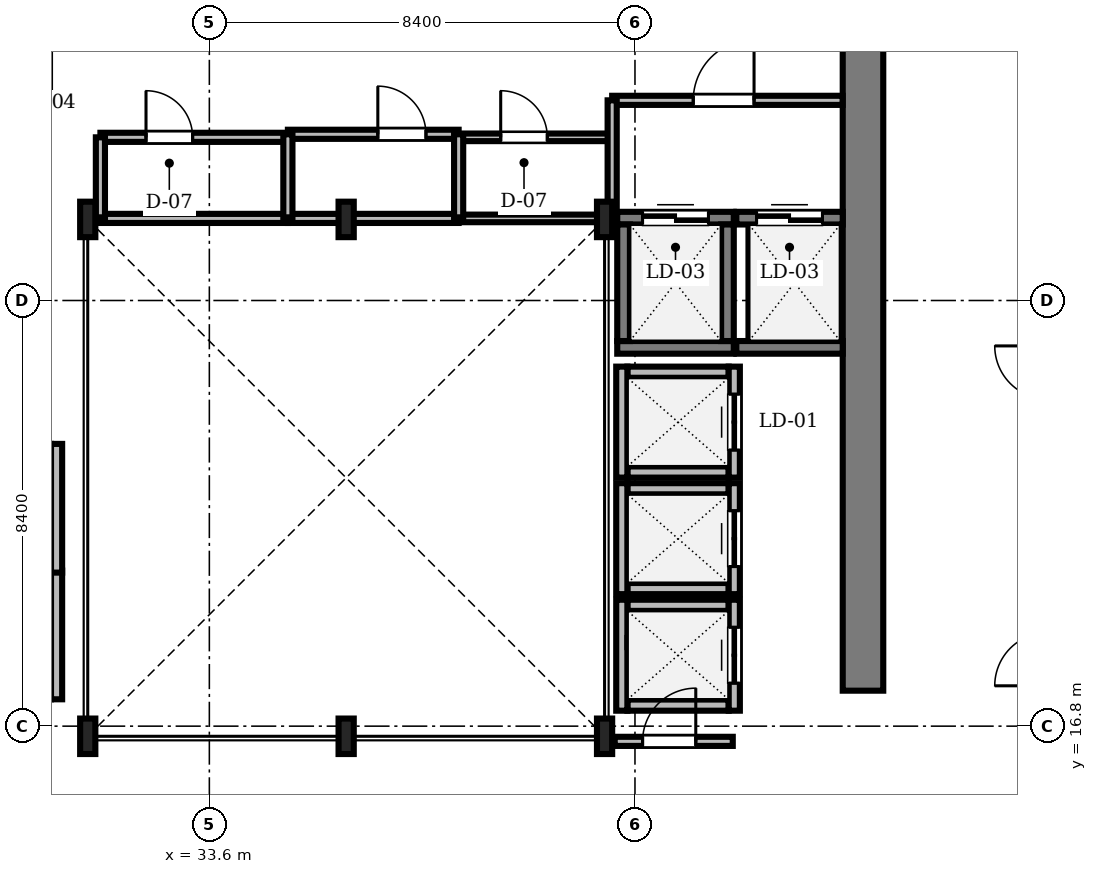
"""IFC4 building model, lengths in metres.
Left out: names, types, materials, properties, quantities, classifications, styles, units other than length and angle.
Written with IfcOpenShell. Run it as: python <this file> out.ifc"""

import sys

from ifc_helpers import new_model, si_unit, direction, frame, frame_2d, origin, origin_2d, place, context, subcontext, project, spatial, rectangle, i_section, extrude, source, transform, mapped, element, fill, save


model = new_model("IFC4")
c1 = context("Model", 3, precision=1e-05, world=origin(), true_north=direction((0.0, 1.0)))
c2 = subcontext(c1, "Body", "Model", "MODEL_VIEW")
j1 = project(units=[si_unit("LENGTHUNIT", "METRE"), si_unit("PLANEANGLEUNIT", "RADIAN")], contexts=[c1])
p1 = place(None, origin())
s1 = spatial("IfcSite", under=j1, at=p1, CompositionType="ELEMENT")
p2 = place(p1, origin())
s2 = spatial("IfcBuilding", under=s1, at=p2, CompositionType="ELEMENT")
p3 = place(p2, frame((0.0, 0.0, 184.8)))
s3 = spatial("IfcBuildingStorey", under=s2, at=p3, CompositionType="ELEMENT", Elevation=184.8)
m1 = source(origin(), c2, "Body", "SweptSolid", [
    extrude(rectangle(XDim=13.15, YDim=0.8, at=frame_2d((6.575, 0.0))), origin(), (0.0, 0.0, 1.0), 3.53),
])
p4 = place(p3, frame((46.5, 17.5, 0.0), z_axis=(0.0, 0.0, 1.0), x_axis=(0.0, 1.0, 0.0)))
e1 = element("IfcWall", 1, at=p4, inside=s3, PredefinedType="SHEAR", context=c2, shape_type="MappedRepresentation", body=[
    mapped(m1, transform((0.0, 0.0, 0.0), scale=1.0)),
])
m2 = source(origin(), c2, "Body", "SweptSolid", [
    extrude(i_section(OverallWidth=0.3, OverallDepth=0.7, WebThickness=0.017, FlangeThickness=0.032, FilletRadius=0.027, at=origin_2d()), origin(), (0.0, 0.0, 1.0), 3.53),
])
for number, where, z_axis, x_axis in (
    (2, (31.2, 16.6, 0.0), (0.0, 0.0, 1.0), (1.0, 0.0, 0.0)),
    (3, (36.3, 16.6, 0.0), (0.0, 0.0, 1.0), (1.0, 0.0, 0.0)),
    (4, (41.4, 16.6, 0.0), (0.0, 0.0, 1.0), (1.0, 0.0, 0.0)),
    (5, (41.4, 26.8, 0.0), (0.0, 0.0, 1.0), (1.0, 0.0, 0.0)),
    (6, (36.3, 26.8, 0.0), (0.0, 0.0, 1.0), (1.0, 0.0, 0.0)),
    (7, (31.2, 26.8, 0.0), (0.0, 0.0, 1.0), (1.0, 0.0, 0.0)),
):
    element("IfcColumn", number, at=place(p3, frame(where, z_axis=z_axis, x_axis=x_axis)), inside=s3, PredefinedType="COLUMN", context=c2, shape_type="MappedRepresentation", body=[
        mapped(m2, transform((0.0, 0.0, 0.0), scale=1.0)),
    ])
m3 = source(origin(), c2, "Body", "SweptSolid", [
    extrude(rectangle(XDim=2.0, YDim=0.22, at=frame_2d((1.0, 0.0))), origin(), (0.0, 0.0, 1.0), 3.53),
])
for number, where, z_axis, x_axis in (
    (8, (41.85, 21.815, 0.0), (0.0, 0.0, 1.0), (1.0, 0.0, 0.0)),
    (9, (41.85, 23.785, 0.0), (0.0, 0.0, 1.0), (1.0, 0.0, 0.0)),
):
    element("IfcWall", number, at=place(p3, frame(where, z_axis=z_axis, x_axis=x_axis)), inside=s3, PredefinedType="SOLIDWALL", context=c2, shape_type="MappedRepresentation", body=[
        mapped(m3, transform((0.0, 0.0, 0.0), scale=1.0)),
    ])
m4 = source(origin(), c2, "Body", "SweptSolid", [
    extrude(rectangle(XDim=2.19, YDim=0.22, at=frame_2d((1.095, 0.0))), origin(), (0.0, 0.0, 1.0), 3.53),
])
p5 = place(p3, frame((41.74, 21.705, 0.0), z_axis=(0.0, 0.0, 1.0), x_axis=(0.0, 1.0, 0.0)))
e10 = element("IfcWall", 10, at=p5, inside=s3, PredefinedType="SOLIDWALL", context=c2, shape_type="MappedRepresentation", body=[
    mapped(m4, transform((0.0, 0.0, 0.0), scale=1.0)),
])
p6 = place(p3, frame((43.96, 21.705, 0.0), z_axis=(0.0, 0.0, 1.0), x_axis=(0.0, 1.0, 0.0)))
e11 = element("IfcWall", 11, at=p6, inside=s3, PredefinedType="SOLIDWALL", context=c2, shape_type="MappedRepresentation", body=[
    mapped(m4, transform((0.0, 0.0, 0.0), scale=1.0)),
])
m5 = source(origin(), c2, "Body", "SweptSolid", [
    extrude(rectangle(XDim=1.1, YDim=2.2, at=frame_2d((0.55, 1.1))), frame((0.0, 0.12, 0.0), z_axis=(0.0, -1.0, 0.0), x_axis=(1.0, 0.0, 0.0)), (0.0, 0.0, 1.0), 0.24),
])
p7 = place(p6, frame((0.545, 0.0, 0.0)))
e12 = element("IfcOpeningElement", 12, at=p7, cuts=e11, PredefinedType="OPENING", context=c2, shape_type="MappedRepresentation", body=[
    mapped(m5, transform((0.0, 0.0, 0.0), scale=1.0)),
])
for number, where, z_axis, x_axis in (
    (13, (41.85, 19.515, 0.0), (0.0, 0.0, 1.0), (1.0, 0.0, 0.0)),
    (14, (41.85, 21.485, 0.0), (0.0, 0.0, 1.0), (1.0, 0.0, 0.0)),
):
    element("IfcWall", number, at=place(p3, frame(where, z_axis=z_axis, x_axis=x_axis)), inside=s3, PredefinedType="SOLIDWALL", context=c2, shape_type="MappedRepresentation", body=[
        mapped(m3, transform((0.0, 0.0, 0.0), scale=1.0)),
    ])
p8 = place(p3, frame((41.74, 19.405, 0.0), z_axis=(0.0, 0.0, 1.0), x_axis=(0.0, 1.0, 0.0)))
e15 = element("IfcWall", 15, at=p8, inside=s3, PredefinedType="SOLIDWALL", context=c2, shape_type="MappedRepresentation", body=[
    mapped(m4, transform((0.0, 0.0, 0.0), scale=1.0)),
])
p9 = place(p3, frame((43.96, 19.405, 0.0), z_axis=(0.0, 0.0, 1.0), x_axis=(0.0, 1.0, 0.0)))
e16 = element("IfcWall", 16, at=p9, inside=s3, PredefinedType="SOLIDWALL", context=c2, shape_type="MappedRepresentation", body=[
    mapped(m4, transform((0.0, 0.0, 0.0), scale=1.0)),
])
p10 = place(p9, frame((0.545, 0.0, 0.0)))
e17 = element("IfcOpeningElement", 17, at=p10, cuts=e16, PredefinedType="OPENING", context=c2, shape_type="MappedRepresentation", body=[
    mapped(m5, transform((0.0, 0.0, 0.0), scale=1.0)),
])
for number, where, z_axis, x_axis in (
    (18, (41.85, 17.215, 0.0), (0.0, 0.0, 1.0), (1.0, 0.0, 0.0)),
    (19, (41.85, 19.185, 0.0), (0.0, 0.0, 1.0), (1.0, 0.0, 0.0)),
):
    element("IfcWall", number, at=place(p3, frame(where, z_axis=z_axis, x_axis=x_axis)), inside=s3, PredefinedType="SOLIDWALL", context=c2, shape_type="MappedRepresentation", body=[
        mapped(m3, transform((0.0, 0.0, 0.0), scale=1.0)),
    ])
p11 = place(p3, frame((41.74, 17.105, 0.0), z_axis=(0.0, 0.0, 1.0), x_axis=(0.0, 1.0, 0.0)))
e20 = element("IfcWall", 20, at=p11, inside=s3, PredefinedType="SOLIDWALL", context=c2, shape_type="MappedRepresentation", body=[
    mapped(m4, transform((0.0, 0.0, 0.0), scale=1.0)),
])
p12 = place(p3, frame((43.96, 17.105, 0.0), z_axis=(0.0, 0.0, 1.0), x_axis=(0.0, 1.0, 0.0)))
e21 = element("IfcWall", 21, at=p12, inside=s3, PredefinedType="SOLIDWALL", context=c2, shape_type="MappedRepresentation", body=[
    mapped(m4, transform((0.0, 0.0, 0.0), scale=1.0)),
])
p13 = place(p12, frame((0.545, 0.0, 0.0)))
e22 = element("IfcOpeningElement", 22, at=p13, cuts=e21, PredefinedType="OPENING", context=c2, shape_type="MappedRepresentation", body=[
    mapped(m5, transform((0.0, 0.0, 0.0), scale=1.0)),
])
m6 = source(origin(), c2, "Body", "SweptSolid", [
    extrude(rectangle(XDim=2.54, YDim=0.22, at=frame_2d((1.27, 0.0))), origin(), (0.0, 0.0, 1.0), 3.53),
])
for number, where, z_axis, x_axis in (
    (23, (30.585, 17.33, 0.0), (0.0, 0.0, 1.0), (0.0, 1.0, 0.0)),
    (24, (30.585, 19.83, 0.0), (0.0, 0.0, 1.0), (0.0, 1.0, 0.0)),
):
    element("IfcWall", number, at=place(p3, frame(where, z_axis=z_axis, x_axis=x_axis)), inside=s3, PredefinedType="SOLIDWALL", context=c2, shape_type="MappedRepresentation", body=[
        mapped(m6, transform((0.0, 0.0, 0.0), scale=1.0)),
    ])
m7 = source(origin(), c2, "Body", "SweptSolid", [
    extrude(rectangle(XDim=2.3, YDim=0.25, at=frame_2d((1.15, 0.0))), origin(), (0.0, 0.0, 1.0), 3.53),
])
p14 = place(p3, frame((41.65, 24.275, 0.0), z_axis=(0.0, 0.0, 1.0), x_axis=(1.0, 0.0, 0.0)))
e25 = element("IfcWall", 25, at=p14, inside=s3, PredefinedType="SOLIDWALL", context=c2, shape_type="MappedRepresentation", body=[
    mapped(m7, transform((0.0, 0.0, 0.0), scale=1.0)),
])
p15 = place(p3, frame((41.65, 26.825, 0.0), z_axis=(0.0, 0.0, 1.0), x_axis=(1.0, 0.0, 0.0)))
e26 = element("IfcWall", 26, at=p15, inside=s3, PredefinedType="SOLIDWALL", context=c2, shape_type="MappedRepresentation", body=[
    mapped(m7, transform((0.0, 0.0, 0.0), scale=1.0)),
])
m8 = source(origin(), c2, "Body", "SweptSolid", [
    extrude(rectangle(XDim=1.3, YDim=2.3, at=frame_2d((0.65, 1.15))), frame((0.0, 0.135, 0.0), z_axis=(0.0, -1.0, 0.0), x_axis=(1.0, 0.0, 0.0)), (0.0, 0.0, 1.0), 0.27),
])
p16 = place(p15, frame((0.5, 0.0, 0.0)))
e27 = element("IfcOpeningElement", 27, at=p16, cuts=e26, PredefinedType="OPENING", context=c2, shape_type="MappedRepresentation", body=[
    mapped(m8, transform((0.0, 0.0, 0.0), scale=1.0)),
])
for number, where, z_axis, x_axis in (
    (28, (41.775, 24.4, 0.0), (0.0, 0.0, 1.0), (0.0, 1.0, 0.0)),
    (29, (43.825, 24.4, 0.0), (0.0, 0.0, 1.0), (0.0, 1.0, 0.0)),
):
    element("IfcWall", number, at=place(p3, frame(where, z_axis=z_axis, x_axis=x_axis)), inside=s3, PredefinedType="SOLIDWALL", context=c2, shape_type="MappedRepresentation", body=[
        mapped(m7, transform((0.0, 0.0, 0.0), scale=1.0)),
    ])
m9 = source(origin(), c2, "Body", "SweptSolid", [
    extrude(rectangle(XDim=2.1, YDim=0.25, at=frame_2d((1.05, 0.0))), origin(), (0.0, 0.0, 1.0), 3.53),
])
p17 = place(p3, frame((44.0, 24.275, 0.0), z_axis=(0.0, 0.0, 1.0), x_axis=(1.0, 0.0, 0.0)))
e30 = element("IfcWall", 30, at=p17, inside=s3, PredefinedType="SOLIDWALL", context=c2, shape_type="MappedRepresentation", body=[
    mapped(m9, transform((0.0, 0.0, 0.0), scale=1.0)),
])
p18 = place(p3, frame((44.0, 26.825, 0.0), z_axis=(0.0, 0.0, 1.0), x_axis=(1.0, 0.0, 0.0)))
e31 = element("IfcWall", 31, at=p18, inside=s3, PredefinedType="SOLIDWALL", context=c2, shape_type="MappedRepresentation", body=[
    mapped(m9, transform((0.0, 0.0, 0.0), scale=1.0)),
])
p19 = place(p18, frame((0.4, 0.0, 0.0)))
e32 = element("IfcOpeningElement", 32, at=p19, cuts=e31, PredefinedType="OPENING", context=c2, shape_type="MappedRepresentation", body=[
    mapped(m8, transform((0.0, 0.0, 0.0), scale=1.0)),
])
m10 = source(origin(), c2, "Body", "SweptSolid", [
    extrude(rectangle(XDim=4.548, YDim=0.18, at=frame_2d((2.274, 0.0))), origin(), (0.0, 0.0, 1.0), 3.162),
])
p20 = place(p3, frame((41.55, 29.15, 0.0), z_axis=(0.0, 0.0, 1.0), x_axis=(1.0, 0.0, 0.0)))
e33 = element("IfcWall", 33, at=p20, inside=s3, PredefinedType="PARTITIONING", context=c2, shape_type="MappedRepresentation", body=[
    mapped(m10, transform((0.0, 0.0, 0.0), scale=1.0)),
])
m11 = source(origin(), c2, "Body", "SweptSolid", [
    extrude(rectangle(XDim=1.2, YDim=2.2, at=frame_2d((0.6, 1.1))), frame((0.0, 0.1, 0.0), z_axis=(0.0, -1.0, 0.0), x_axis=(1.0, 0.0, 0.0)), (0.0, 0.0, 1.0), 0.2),
])
p21 = place(p20, frame((1.6, 0.0, 0.0)))
e34 = element("IfcOpeningElement", 34, at=p21, cuts=e33, PredefinedType="OPENING", context=c2, shape_type="MappedRepresentation", body=[
    mapped(m11, transform((0.0, 0.0, 0.0), scale=1.0)),
])
m12 = source(origin(), c2, "Body", "SweptSolid", [
    extrude(rectangle(XDim=3.7, YDim=0.18, at=frame_2d((1.85, 0.0))), origin(), (0.0, 0.0, 1.0), 3.162),
])
p22 = place(p3, frame((31.45, 28.42, 0.0), z_axis=(0.0, 0.0, 1.0), x_axis=(1.0, 0.0, 0.0)))
e35 = element("IfcWall", 35, at=p22, inside=s3, PredefinedType="PARTITIONING", context=c2, shape_type="MappedRepresentation", body=[
    mapped(m12, transform((0.0, 0.0, 0.0), scale=1.0)),
])
m13 = source(origin(), c2, "Body", "SweptSolid", [
    extrude(rectangle(XDim=0.92, YDim=2.1, at=frame_2d((0.46, 1.05))), frame((0.0, 0.1, 0.0), z_axis=(0.0, -1.0, 0.0), x_axis=(1.0, 0.0, 0.0)), (0.0, 0.0, 1.0), 0.2),
])
p23 = place(p22, frame((0.9, 0.0, 0.0)))
e36 = element("IfcOpeningElement", 36, at=p23, cuts=e35, PredefinedType="OPENING", context=c2, shape_type="MappedRepresentation", body=[
    mapped(m13, transform((0.0, 0.0, 0.0), scale=1.0)),
])
m14 = source(origin(), c2, "Body", "SweptSolid", [
    extrude(rectangle(XDim=3.37, YDim=0.18, at=frame_2d((1.685, 0.0))), origin(), (0.0, 0.0, 1.0), 3.53),
])
p24 = place(p3, frame((35.15, 28.48, 0.0), z_axis=(0.0, 0.0, 1.0), x_axis=(1.0, 0.0, 0.0)))
e37 = element("IfcWall", 37, at=p24, inside=s3, PredefinedType="PARTITIONING", context=c2, shape_type="MappedRepresentation", body=[
    mapped(m14, transform((0.0, 0.0, 0.0), scale=1.0)),
])
m15 = source(origin(), c2, "Body", "SweptSolid", [
    extrude(rectangle(XDim=0.95, YDim=2.15, at=frame_2d((0.475, 1.075))), frame((0.0, 0.1, 0.0), z_axis=(0.0, -1.0, 0.0), x_axis=(1.0, 0.0, 0.0)), (0.0, 0.0, 1.0), 0.2),
])
p25 = place(p24, frame((1.775, 0.0, 0.0)))
e38 = element("IfcOpeningElement", 38, at=p25, cuts=e37, PredefinedType="OPENING", context=c2, shape_type="MappedRepresentation", body=[
    mapped(m15, transform((0.0, 0.0, 0.0), scale=1.0)),
])
m16 = source(origin(), c2, "Body", "SweptSolid", [
    extrude(rectangle(XDim=3.0, YDim=0.15, at=frame_2d((1.5, 0.0))), origin(), (0.0, 0.0, 1.0), 3.53),
])
p26 = place(p3, frame((38.52, 28.42, 0.0), z_axis=(0.0, 0.0, 1.0), x_axis=(1.0, 0.0, 0.0)))
e39 = element("IfcWall", 39, at=p26, inside=s3, PredefinedType="PARTITIONING", context=c2, shape_type="MappedRepresentation", body=[
    mapped(m16, transform((0.0, 0.0, 0.0), scale=1.0)),
])
m17 = source(origin(), c2, "Body", "SweptSolid", [
    extrude(rectangle(XDim=0.92, YDim=2.1, at=frame_2d((0.46, 1.05))), frame((0.0, 0.085, 0.0), z_axis=(0.0, -1.0, 0.0), x_axis=(1.0, 0.0, 0.0)), (0.0, 0.0, 1.0), 0.17),
])
p27 = place(p26, frame((0.83, 0.0, 0.0)))
e40 = element("IfcOpeningElement", 40, at=p27, cuts=e39, PredefinedType="OPENING", context=c2, shape_type="MappedRepresentation", body=[
    mapped(m17, transform((0.0, 0.0, 0.0), scale=1.0)),
])
m18 = source(origin(), c2, "Body", "SweptSolid", [
    extrude(rectangle(XDim=2.33, YDim=0.18, at=frame_2d((1.165, 0.0))), origin(), (0.0, 0.0, 1.0), 2.972),
])
p28 = place(p3, frame((41.6, 16.5, 0.0), z_axis=(0.0, 0.0, 1.0), x_axis=(1.0, 0.0, 0.0)))
e41 = element("IfcWall", 41, at=p28, inside=s3, PredefinedType="PARTITIONING", context=c2, shape_type="MappedRepresentation", body=[
    mapped(m18, transform((0.0, 0.0, 0.0), scale=1.0)),
])
m19 = source(origin(), c2, "Body", "SweptSolid", [
    extrude(rectangle(XDim=1.05, YDim=2.2, at=frame_2d((0.525, 1.1))), frame((0.0, 0.1, 0.0), z_axis=(0.0, -1.0, 0.0), x_axis=(1.0, 0.0, 0.0)), (0.0, 0.0, 1.0), 0.2),
])
p29 = place(p28, frame((0.55, 0.0, 0.0)))
e42 = element("IfcOpeningElement", 42, at=p29, cuts=e41, PredefinedType="OPENING", context=c2, shape_type="MappedRepresentation", body=[
    mapped(m19, transform((0.0, 0.0, 0.0), scale=1.0)),
])
m20 = source(origin(), c2, "Body", "SweptSolid", [
    extrude(rectangle(XDim=3.7, YDim=0.18, at=frame_2d((1.85, 0.0))), origin(), (0.0, 0.0, 1.0), 3.072),
])
p30 = place(p3, frame((31.45, 26.82, 0.0), z_axis=(0.0, 0.0, 1.0), x_axis=(1.0, 0.0, 0.0)))
e43 = element("IfcWall", 43, at=p30, inside=s3, PredefinedType="PARTITIONING", context=c2, shape_type="MappedRepresentation", body=[
    mapped(m20, transform((0.0, 0.0, 0.0), scale=1.0)),
])
m21 = source(origin(), c2, "Body", "SweptSolid", [
    extrude(rectangle(XDim=3.37, YDim=0.18, at=frame_2d((1.685, 0.0))), origin(), (0.0, 0.0, 1.0), 3.072),
])
p31 = place(p3, frame((35.15, 26.82, 0.0), z_axis=(0.0, 0.0, 1.0), x_axis=(1.0, 0.0, 0.0)))
e44 = element("IfcWall", 44, at=p31, inside=s3, PredefinedType="PARTITIONING", context=c2, shape_type="MappedRepresentation", body=[
    mapped(m21, transform((0.0, 0.0, 0.0), scale=1.0)),
])
m22 = source(origin(), c2, "Body", "SweptSolid", [
    extrude(rectangle(XDim=3.0, YDim=0.15, at=frame_2d((1.5, 0.0))), origin(), (0.0, 0.0, 1.0), 2.972),
])
p32 = place(p3, frame((38.52, 26.82, 0.0), z_axis=(0.0, 0.0, 1.0), x_axis=(1.0, 0.0, 0.0)))
e45 = element("IfcWall", 45, at=p32, inside=s3, PredefinedType="PARTITIONING", context=c2, shape_type="MappedRepresentation", body=[
    mapped(m22, transform((0.0, 0.0, 0.0), scale=1.0)),
])
m23 = source(origin(), c2, "Body", "SweptSolid", [
    extrude(rectangle(XDim=2.35, YDim=0.18, at=frame_2d((1.175, 0.0))), origin(), (0.0, 0.0, 1.0), 2.972),
])
p33 = place(p3, frame((41.55, 26.8, 0.0), z_axis=(0.0, 0.0, 1.0), x_axis=(0.0, 1.0, 0.0)))
e46 = element("IfcWall", 46, at=p33, inside=s3, PredefinedType="PARTITIONING", context=c2, shape_type="MappedRepresentation", body=[
    mapped(m23, transform((0.0, 0.0, 0.0), scale=1.0)),
])
m24 = source(origin(), c2, "Body", "SweptSolid", [
    extrude(rectangle(XDim=1.858, YDim=0.18, at=frame_2d((0.929, 0.0))), origin(), (0.0, 0.0, 1.0), 3.53),
])
p34 = place(p3, frame((41.852, 18.45, 0.0), z_axis=(0.0, 0.0, 1.0), x_axis=(1.0, 0.0, 0.0)))
e47 = element("IfcWall", 47, at=p34, inside=s3, PredefinedType="PARTITIONING", context=c2, shape_type="MappedRepresentation", body=[
    mapped(m24, transform((0.0, 0.0, 0.0), scale=1.0)),
])
m25 = source(origin(), c2, "Body", "SweptSolid", [
    extrude(rectangle(XDim=1.66, YDim=0.18, at=frame_2d((0.83, 0.0))), origin(), (0.0, 0.0, 1.0), 3.072),
])
for number, where, z_axis, x_axis in (
    (48, (35.15, 26.82, 0.0), (0.0, 0.0, 1.0), (0.0, 1.0, 0.0)),
    (49, (38.52, 26.82, 0.0), (0.0, 0.0, 1.0), (0.0, 1.0, 0.0)),
):
    element("IfcWall", number, at=place(p3, frame(where, z_axis=z_axis, x_axis=x_axis)), inside=s3, PredefinedType="PARTITIONING", context=c2, shape_type="MappedRepresentation", body=[
        mapped(m25, transform((0.0, 0.0, 0.0), scale=1.0)),
    ])
m26 = source(origin(), c2, "Body", "SweptSolid", [
    extrude(rectangle(XDim=1.6, YDim=0.18, at=frame_2d((0.8, 0.0))), origin(), (0.0, 0.0, 1.0), 3.072),
])
p35 = place(p3, frame((31.45, 26.82, 0.0), z_axis=(0.0, 0.0, 1.0), x_axis=(0.0, 1.0, 0.0)))
e50 = element("IfcWall", 50, at=p35, inside=s3, PredefinedType="PARTITIONING", context=c2, shape_type="MappedRepresentation", body=[
    mapped(m26, transform((0.0, 0.0, 0.0), scale=1.0)),
])
m27 = source(origin(), c2, "Body", "SweptSolid", [
    extrude(rectangle(XDim=1.1, YDim=2.2, at=frame_2d((0.55, 1.1))), frame((0.0, 0.025, 0.0), z_axis=(0.0, -1.0, 0.0), x_axis=(1.0, 0.0, 0.0)), (0.0, 0.0, 1.0), 0.05),
])
p36 = place(p7, origin())
e51 = element("IfcDoor", 51, at=p36, inside=s3, OperationType="DOUBLE_DOOR_SLIDING", PredefinedType="DOOR", context=c2, shape_type="MappedRepresentation", body=[
    mapped(m27, transform((0.0, 0.0, 0.0), scale=1.0)),
])
fill(e12, e51)
p37 = place(p10, origin())
e52 = element("IfcDoor", 52, at=p37, inside=s3, OperationType="DOUBLE_DOOR_SLIDING", PredefinedType="DOOR", context=c2, shape_type="MappedRepresentation", body=[
    mapped(m27, transform((0.0, 0.0, 0.0), scale=1.0)),
])
fill(e17, e52)
p38 = place(p13, origin())
e53 = element("IfcDoor", 53, at=p38, inside=s3, OperationType="DOUBLE_DOOR_SLIDING", PredefinedType="DOOR", context=c2, shape_type="MappedRepresentation", body=[
    mapped(m27, transform((0.0, 0.0, 0.0), scale=1.0)),
])
fill(e22, e53)
m28 = source(origin(), c2, "Body", "SweptSolid", [
    extrude(rectangle(XDim=1.3, YDim=2.3, at=frame_2d((0.65, 1.15))), frame((0.0, 0.025, 0.0), z_axis=(0.0, -1.0, 0.0), x_axis=(1.0, 0.0, 0.0)), (0.0, 0.0, 1.0), 0.05),
])
p39 = place(p16, origin())
e54 = element("IfcDoor", 54, at=p39, inside=s3, OperationType="DOUBLE_DOOR_SLIDING", PredefinedType="DOOR", context=c2, shape_type="MappedRepresentation", body=[
    mapped(m28, transform((0.0, 0.0, 0.0), scale=1.0)),
])
fill(e27, e54)
p40 = place(p19, origin())
e55 = element("IfcDoor", 55, at=p40, inside=s3, OperationType="DOUBLE_DOOR_SLIDING", PredefinedType="DOOR", context=c2, shape_type="MappedRepresentation", body=[
    mapped(m28, transform((0.0, 0.0, 0.0), scale=1.0)),
])
fill(e32, e55)
m29 = source(origin(), c2, "Body", "SweptSolid", [
    extrude(rectangle(XDim=1.2, YDim=2.2, at=frame_2d((0.6, 1.1))), frame((0.0, 0.025, 0.0), z_axis=(0.0, -1.0, 0.0), x_axis=(1.0, 0.0, 0.0)), (0.0, 0.0, 1.0), 0.05),
])
p41 = place(p21, origin())
e56 = element("IfcDoor", 56, at=p41, inside=s3, OperationType="SINGLE_SWING_RIGHT", PredefinedType="DOOR", context=c2, shape_type="MappedRepresentation", body=[
    mapped(m29, transform((0.0, 0.0, 0.0), scale=1.0)),
])
fill(e34, e56)
m30 = source(origin(), c2, "Body", "SweptSolid", [
    extrude(rectangle(XDim=0.92, YDim=2.1, at=frame_2d((0.46, 1.05))), frame((0.0, 0.025, 0.0), z_axis=(0.0, -1.0, 0.0), x_axis=(1.0, 0.0, 0.0)), (0.0, 0.0, 1.0), 0.05),
])
p42 = place(p23, origin())
e57 = element("IfcDoor", 57, at=p42, inside=s3, OperationType="SINGLE_SWING_LEFT", PredefinedType="DOOR", context=c2, shape_type="MappedRepresentation", body=[
    mapped(m30, transform((0.0, 0.0, 0.0), scale=1.0)),
])
fill(e36, e57)
m31 = source(origin(), c2, "Body", "SweptSolid", [
    extrude(rectangle(XDim=0.95, YDim=2.15, at=frame_2d((0.475, 1.075))), frame((0.0, 0.025, 0.0), z_axis=(0.0, -1.0, 0.0), x_axis=(1.0, 0.0, 0.0)), (0.0, 0.0, 1.0), 0.05),
])
p43 = place(p25, origin())
e58 = element("IfcDoor", 58, at=p43, inside=s3, OperationType="SINGLE_SWING_LEFT", PredefinedType="DOOR", context=c2, shape_type="MappedRepresentation", body=[
    mapped(m31, transform((0.0, 0.0, 0.0), scale=1.0)),
])
fill(e38, e58)
p44 = place(p27, origin())
e59 = element("IfcDoor", 59, at=p44, inside=s3, OperationType="SINGLE_SWING_LEFT", PredefinedType="DOOR", context=c2, shape_type="MappedRepresentation", body=[
    mapped(m30, transform((0.0, 0.0, 0.0), scale=1.0)),
])
fill(e40, e59)
m32 = source(origin(), c2, "Body", "SweptSolid", [
    extrude(rectangle(XDim=1.05, YDim=2.2, at=frame_2d((0.525, 1.1))), frame((0.0, 0.025, 0.0), z_axis=(0.0, -1.0, 0.0), x_axis=(1.0, 0.0, 0.0)), (0.0, 0.0, 1.0), 0.05),
])
p45 = place(p29, origin())
e60 = element("IfcDoor", 60, at=p45, inside=s3, OperationType="SINGLE_SWING_RIGHT", PredefinedType="DOOR", context=c2, shape_type="MappedRepresentation", body=[
    mapped(m32, transform((0.0, 0.0, 0.0), scale=1.0)),
])
fill(e42, e60)
save(model, sys.argv[1])
